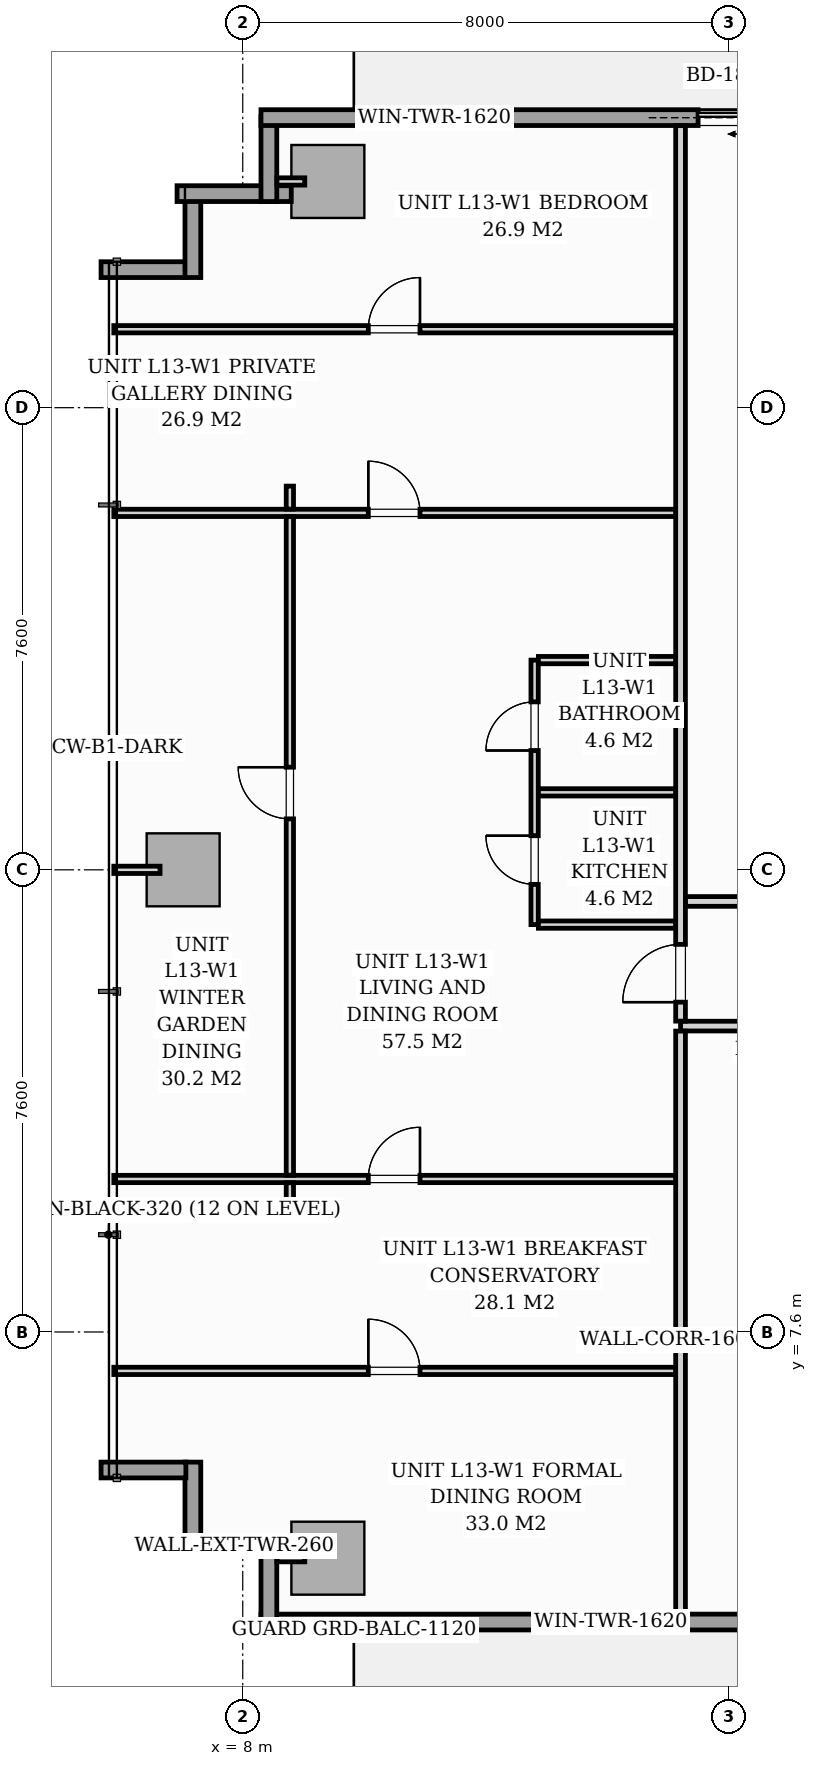
"""IFC4 building model, lengths in metres.
Left out: names, types, materials, properties, quantities, classifications, styles, units other than length and angle.
Written with IfcOpenShell. Run it as: python <this file> out.ifc"""

import sys

from ifc_helpers import new_model, si_unit, direction, frame, frame_2d, origin, origin_2d, place, context, subcontext, project, spatial, rectangle, extrude, source, transform, mapped, element, fill, save


model = new_model("IFC4")
c1 = context("Model", 3, precision=1e-05, world=origin(), true_north=direction((0.0, 1.0)))
c2 = subcontext(c1, "Body", "Model", "MODEL_VIEW")
j1 = project(units=[si_unit("LENGTHUNIT", "METRE"), si_unit("PLANEANGLEUNIT", "RADIAN")], contexts=[c1])
p1 = place(None, origin())
s1 = spatial("IfcSite", under=j1, at=p1, CompositionType="ELEMENT")
p2 = place(p1, origin())
s2 = spatial("IfcBuilding", under=s1, at=p2, CompositionType="ELEMENT")
p3 = place(p2, frame((0.0, 0.0, 48.6)))
s3 = spatial("IfcBuildingStorey", under=s2, at=p3, CompositionType="ELEMENT", Elevation=48.6)
m1 = source(origin(), c2, "Body", "SweptSolid", [
    extrude(rectangle(XDim=1.2, YDim=1.2, at=origin_2d()), origin(), (0.0, 0.0, 1.0), 3.196),
])
for number, where, z_axis, x_axis in (
    (1, (9.4, 3.88, 0.002), (0.0, 0.0, 1.0), (1.0, 0.0, 0.0)),
    (2, (9.4, 26.52, 0.002), (0.0, 0.0, 1.0), (1.0, 0.0, 0.0)),
    (3, (7.02, 15.2, 0.002), (0.0, 0.0, 1.0), (1.0, 0.0, 0.0)),
):
    element("IfcColumn", number, at=place(p3, frame(where, z_axis=z_axis, x_axis=x_axis)), inside=s3, PredefinedType="COLUMN", context=c2, shape_type="MappedRepresentation", body=[
        mapped(m1, transform((0.0, 0.0, 0.0), scale=1.0)),
    ])
p4 = place(p3, frame((8.798, 4.08, 0.0), z_axis=(0.0, 0.0, 1.0), x_axis=(-1.0, 0.0, 0.0)))
e4 = element("IfcWall", 4, at=p4, inside=s3, PredefinedType="STANDARD", context=c2, shape_type="SweptSolid", body=[
    extrude(rectangle(XDim=1.878, YDim=0.26, at=frame_2d((0.939, 0.0))), origin(), (0.0, 0.0, 1.0), 2.94),
])
for number, where, z_axis, x_axis in (
    (5, (7.18, 4.065, 0.0), (0.0, 0.0, 1.0), (0.0, 1.0, 0.0)),
    (6, (7.065, 5.33, 0.0), (0.0, 0.0, 1.0), (-1.0, 0.0, 0.0)),
    (7, (5.67, 25.07, 0.0), (0.0, 0.0, 1.0), (1.0, 0.0, 0.0)),
    (8, (7.18, 24.94, 0.0), (0.0, 0.0, 1.0), (0.0, 1.0, 0.0)),
):
    element("IfcWall", number, at=place(p3, frame(where, z_axis=z_axis, x_axis=x_axis)), inside=s3, PredefinedType="STANDARD", context=c2, shape_type="SweptSolid", body=[
        extrude(rectangle(XDim=1.395, YDim=0.26, at=frame_2d((0.698, 0.0))), origin(), (0.0, 0.0, 1.0), 2.94),
    ])
p5 = place(p3, frame((6.92, 26.32, 0.0), z_axis=(0.0, 0.0, 1.0), x_axis=(1.0, 0.0, 0.0)))
e9 = element("IfcWall", 9, at=p5, inside=s3, PredefinedType="STANDARD", context=c2, shape_type="SweptSolid", body=[
    extrude(rectangle(XDim=1.878, YDim=0.26, at=frame_2d((0.939, 0.0))), origin(), (0.0, 0.0, 1.0), 2.94),
])
p6 = place(p3, frame((8.43, 26.19, 0.0), z_axis=(0.0, 0.0, 1.0), x_axis=(0.0, 1.0, 0.0)))
e10 = element("IfcWall", 10, at=p6, inside=s3, PredefinedType="STANDARD", context=c2, shape_type="SweptSolid", body=[
    extrude(rectangle(XDim=1.395, YDim=0.26, at=frame_2d((0.698, 0.0))), origin(), (0.0, 0.0, 1.0), 2.94),
])
p7 = place(p3, frame((8.3, 27.57, 0.0), z_axis=(0.0, 0.0, 1.0), x_axis=(1.0, 0.0, 0.0)))
e11 = element("IfcWall", 11, at=p7, inside=s3, PredefinedType="STANDARD", context=c2, shape_type="SweptSolid", body=[
    extrude(rectangle(XDim=17.15, YDim=0.26, at=frame_2d((8.575, 0.0))), origin(), (0.0, 0.0, 1.0), 2.94),
])
p8 = place(p7, frame((7.188, 0.0, 0.0)))
e12 = element("IfcOpeningElement", 12, at=p8, cuts=e11, PredefinedType="OPENING", context=c2, shape_type="SweptSolid", body=[
    extrude(rectangle(XDim=1.8, YDim=2.06, at=frame_2d((0.9, 1.03))), frame((0.0, 0.14, 0.0), z_axis=(0.0, -1.0, 0.0), x_axis=(1.0, 0.0, 0.0)), (0.0, 0.0, 1.0), 0.28),
])
p9 = place(p7, frame((2.05, 0.0, 0.65)))
e13 = element("IfcOpeningElement", 13, at=p9, cuts=e11, PredefinedType="OPENING", context=c2, shape_type="SweptSolid", body=[
    extrude(rectangle(XDim=1.6, YDim=1.5, at=frame_2d((0.8, 0.75))), frame((0.0, 0.14, 0.0), z_axis=(0.0, -1.0, 0.0), x_axis=(1.0, 0.0, 0.0)), (0.0, 0.0, 1.0), 0.28),
])
p10 = place(p3, frame((25.45, 2.83, 0.0), z_axis=(0.0, 0.0, 1.0), x_axis=(-1.0, 0.0, 0.0)))
e14 = element("IfcWall", 14, at=p10, inside=s3, PredefinedType="STANDARD", context=c2, shape_type="SweptSolid", body=[
    extrude(rectangle(XDim=17.15, YDim=0.26, at=frame_2d((8.575, 0.0))), origin(), (0.0, 0.0, 1.0), 2.94),
])
p11 = place(p10, frame((7.07, 0.0, 0.0)))
e15 = element("IfcOpeningElement", 15, at=p11, cuts=e14, PredefinedType="OPENING", context=c2, shape_type="SweptSolid", body=[
    extrude(rectangle(XDim=1.8, YDim=2.06, at=frame_2d((0.9, 1.03))), frame((0.0, 0.14, 0.0), z_axis=(0.0, -1.0, 0.0), x_axis=(1.0, 0.0, 0.0)), (0.0, 0.0, 1.0), 0.28),
])
p12 = place(p10, frame((10.6, 0.0, 0.65)))
e16 = element("IfcOpeningElement", 16, at=p12, cuts=e14, PredefinedType="OPENING", context=c2, shape_type="SweptSolid", body=[
    extrude(rectangle(XDim=1.6, YDim=1.5, at=frame_2d((0.8, 0.75))), frame((0.0, 0.14, 0.0), z_axis=(0.0, -1.0, 0.0), x_axis=(1.0, 0.0, 0.0)), (0.0, 0.0, 1.0), 0.28),
])
p13 = place(p10, frame((0.413, 0.0, 0.75)))
e17 = element("IfcOpeningElement", 17, at=p13, cuts=e14, PredefinedType="OPENING", context=c2, shape_type="SweptSolid", body=[
    extrude(rectangle(XDim=1.6, YDim=1.5, at=frame_2d((0.8, 0.75))), frame((0.0, 0.14, 0.0), z_axis=(0.0, -1.0, 0.0), x_axis=(1.0, 0.0, 0.0)), (0.0, 0.0, 1.0), 0.28),
])
p14 = place(p3, frame((8.43, 2.815, 0.0), z_axis=(0.0, 0.0, 1.0), x_axis=(0.0, 1.0, 0.0)))
e18 = element("IfcWall", 18, at=p14, inside=s3, PredefinedType="STANDARD", context=c2, shape_type="SweptSolid", body=[
    extrude(rectangle(XDim=1.395, YDim=0.26, at=frame_2d((0.698, 0.0))), origin(), (0.0, 0.0, 1.0), 2.94),
])
p15 = place(p3, frame((15.2, 12.63, 0.0), z_axis=(0.0, 0.0, 1.0), x_axis=(1.0, 0.0, 0.0)))
e19 = element("IfcWall", 19, at=p15, inside=s3, PredefinedType="PARTITIONING", context=c2, shape_type="SweptSolid", body=[
    extrude(rectangle(XDim=37.1, YDim=0.16, at=frame_2d((18.55, 0.0))), origin(), (0.0, 0.0, 1.0), 2.94),
])
p16 = place(p15, frame((1.572, 0.0, 0.0)))
e20 = element("IfcOpeningElement", 20, at=p16, cuts=e19, PredefinedType="OPENING", context=c2, shape_type="SweptSolid", body=[
    extrude(rectangle(XDim=0.95, YDim=2.06, at=frame_2d((0.475, 1.03))), frame((0.0, 0.09, 0.0), z_axis=(0.0, -1.0, 0.0), x_axis=(1.0, 0.0, 0.0)), (0.0, 0.0, 1.0), 0.18),
])
p17 = place(p15, frame((14.877, 0.0, 0.0)))
e21 = element("IfcOpeningElement", 21, at=p17, cuts=e19, PredefinedType="OPENING", context=c2, shape_type="SweptSolid", body=[
    extrude(rectangle(XDim=0.95, YDim=2.06, at=frame_2d((0.475, 1.03))), frame((0.0, 0.09, 0.0), z_axis=(0.0, -1.0, 0.0), x_axis=(1.0, 0.0, 0.0)), (0.0, 0.0, 1.0), 0.18),
])
p18 = place(p15, frame((28.476, 0.0, 0.0)))
e22 = element("IfcOpeningElement", 22, at=p18, cuts=e19, PredefinedType="OPENING", context=c2, shape_type="SweptSolid", body=[
    extrude(rectangle(XDim=0.95, YDim=2.06, at=frame_2d((0.475, 1.03))), frame((0.0, 0.09, 0.0), z_axis=(0.0, -1.0, 0.0), x_axis=(1.0, 0.0, 0.0)), (0.0, 0.0, 1.0), 0.18),
])
p19 = place(p3, frame((15.2, 2.962, 0.0), z_axis=(0.0, 0.0, 1.0), x_axis=(0.0, 1.0, 0.0)))
e23 = element("IfcWall", 23, at=p19, inside=s3, PredefinedType="PARTITIONING", context=c2, shape_type="SweptSolid", body=[
    extrude(rectangle(XDim=9.586, YDim=0.16, at=frame_2d((4.793, 0.0))), origin(), (0.0, 0.0, 1.0), 2.94),
])
p20 = place(p3, frame((15.2, 12.712, 0.0), z_axis=(0.0, 0.0, 1.0), x_axis=(0.0, 1.0, 0.0)))
e24 = element("IfcWall", 24, at=p20, inside=s3, PredefinedType="PARTITIONING", context=c2, shape_type="SweptSolid", body=[
    extrude(rectangle(XDim=14.726, YDim=0.16, at=frame_2d((7.363, 0.0))), origin(), (0.0, 0.0, 1.0), 2.94),
])
p21 = place(p20, frame((0.312, 0.0, 0.0)))
e25 = element("IfcOpeningElement", 25, at=p21, cuts=e24, PredefinedType="OPENING", context=c2, shape_type="SweptSolid", body=[
    extrude(rectangle(XDim=0.95, YDim=2.06, at=frame_2d((0.475, 1.03))), frame((0.0, 0.09, 0.0), z_axis=(0.0, -1.0, 0.0), x_axis=(1.0, 0.0, 0.0)), (0.0, 0.0, 1.0), 0.18),
])
p22 = place(p3, frame((12.8, 14.299, 0.0), z_axis=(0.0, 0.0, 1.0), x_axis=(0.0, 1.0, 0.0)))
e26 = element("IfcWall", 26, at=p22, inside=s3, PredefinedType="PARTITIONING", context=c2, shape_type="SweptSolid", body=[
    extrude(rectangle(XDim=4.35, YDim=0.12, at=frame_2d((2.175, 0.0))), origin(), (0.0, 0.0, 1.0), 2.94),
])
p23 = place(p22, frame((0.662, 0.0, 0.0)))
e27 = element("IfcOpeningElement", 27, at=p23, cuts=e26, PredefinedType="OPENING", context=c2, shape_type="SweptSolid", body=[
    extrude(rectangle(XDim=0.8, YDim=2.0, at=frame_2d((0.4, 1.0))), frame((0.0, 0.07, 0.0), z_axis=(0.0, -1.0, 0.0), x_axis=(1.0, 0.0, 0.0)), (0.0, 0.0, 1.0), 0.14),
])
p24 = place(p22, frame((2.863, 0.0, 0.0)))
e28 = element("IfcOpeningElement", 28, at=p24, cuts=e26, PredefinedType="OPENING", context=c2, shape_type="SweptSolid", body=[
    extrude(rectangle(XDim=0.8, YDim=2.02, at=frame_2d((0.4, 1.01))), frame((0.0, 0.07, 0.0), z_axis=(0.0, -1.0, 0.0), x_axis=(1.0, 0.0, 0.0)), (0.0, 0.0, 1.0), 0.14),
])
for number, where, z_axis, x_axis in (
    (29, (12.862, 16.474, 0.0), (0.0, 0.0, 1.0), (1.0, 0.0, 0.0)),
    (30, (12.862, 14.299, 0.0), (0.0, 0.0, 1.0), (1.0, 0.0, 0.0)),
    (31, (12.862, 18.649, 0.0), (0.0, 0.0, 1.0), (1.0, 0.0, 0.0)),
):
    element("IfcWall", number, at=place(p3, frame(where, z_axis=z_axis, x_axis=x_axis)), inside=s3, PredefinedType="PARTITIONING", context=c2, shape_type="SweptSolid", body=[
        extrude(rectangle(XDim=2.256, YDim=0.12, at=frame_2d((1.128, 0.0))), origin(), (0.0, 0.0, 1.0), 2.94),
    ])
p25 = place(p3, frame((5.88, 24.09, 0.0), z_axis=(0.0, 0.0, 1.0), x_axis=(1.0, 0.0, 0.0)))
e32 = element("IfcWall", 32, at=p25, inside=s3, PredefinedType="PARTITIONING", context=c2, shape_type="SweptSolid", body=[
    extrude(rectangle(XDim=9.238, YDim=0.12, at=frame_2d((4.619, 0.0))), origin(), (0.0, 0.0, 1.0), 2.94),
])
p26 = place(p25, frame((4.185, 0.0, 0.0)))
e33 = element("IfcOpeningElement", 33, at=p26, cuts=e32, PredefinedType="OPENING", context=c2, shape_type="SweptSolid", body=[
    extrude(rectangle(XDim=0.85, YDim=2.05, at=frame_2d((0.425, 1.025))), frame((0.0, 0.07, 0.0), z_axis=(0.0, -1.0, 0.0), x_axis=(1.0, 0.0, 0.0)), (0.0, 0.0, 1.0), 0.14),
])
p27 = place(p3, frame((5.88, 6.96, 0.0), z_axis=(0.0, 0.0, 1.0), x_axis=(1.0, 0.0, 0.0)))
e34 = element("IfcWall", 34, at=p27, inside=s3, PredefinedType="PARTITIONING", context=c2, shape_type="SweptSolid", body=[
    extrude(rectangle(XDim=9.238, YDim=0.12, at=frame_2d((4.619, 0.0))), origin(), (0.0, 0.0, 1.0), 2.94),
])
p28 = place(p27, frame((4.185, 0.0, 0.0)))
e35 = element("IfcOpeningElement", 35, at=p28, cuts=e34, PredefinedType="OPENING", context=c2, shape_type="SweptSolid", body=[
    extrude(rectangle(XDim=0.85, YDim=2.05, at=frame_2d((0.425, 1.025))), frame((0.0, 0.07, 0.0), z_axis=(0.0, -1.0, 0.0), x_axis=(1.0, 0.0, 0.0)), (0.0, 0.0, 1.0), 0.14),
])
p29 = place(p3, frame((5.88, 10.116, 0.0), z_axis=(0.0, 0.0, 1.0), x_axis=(1.0, 0.0, 0.0)))
e36 = element("IfcWall", 36, at=p29, inside=s3, PredefinedType="PARTITIONING", context=c2, shape_type="SweptSolid", body=[
    extrude(rectangle(XDim=9.238, YDim=0.12, at=frame_2d((4.619, 0.0))), origin(), (0.0, 0.0, 1.0), 2.94),
])
p30 = place(p29, frame((4.185, 0.0, 0.0)))
e37 = element("IfcOpeningElement", 37, at=p30, cuts=e36, PredefinedType="OPENING", context=c2, shape_type="SweptSolid", body=[
    extrude(rectangle(XDim=0.85, YDim=2.05, at=frame_2d((0.425, 1.025))), frame((0.0, 0.07, 0.0), z_axis=(0.0, -1.0, 0.0), x_axis=(1.0, 0.0, 0.0)), (0.0, 0.0, 1.0), 0.14),
])
p31 = place(p3, frame((5.88, 21.07, 0.0), z_axis=(0.0, 0.0, 1.0), x_axis=(1.0, 0.0, 0.0)))
e38 = element("IfcWall", 38, at=p31, inside=s3, PredefinedType="PARTITIONING", context=c2, shape_type="SweptSolid", body=[
    extrude(rectangle(XDim=9.238, YDim=0.12, at=frame_2d((4.619, 0.0))), origin(), (0.0, 0.0, 1.0), 2.94),
])
p32 = place(p31, frame((4.185, 0.0, 0.0)))
e39 = element("IfcOpeningElement", 39, at=p32, cuts=e38, PredefinedType="OPENING", context=c2, shape_type="SweptSolid", body=[
    extrude(rectangle(XDim=0.85, YDim=2.05, at=frame_2d((0.425, 1.025))), frame((0.0, 0.07, 0.0), z_axis=(0.0, -1.0, 0.0), x_axis=(1.0, 0.0, 0.0)), (0.0, 0.0, 1.0), 0.14),
])
p33 = place(p3, frame((8.775, 9.676, 0.0), z_axis=(0.0, 0.0, 1.0), x_axis=(0.0, 1.0, 0.0)))
e40 = element("IfcWall", 40, at=p33, inside=s3, PredefinedType="PARTITIONING", context=c2, shape_type="SweptSolid", body=[
    extrude(rectangle(XDim=0.378, YDim=0.12, at=frame_2d((0.189, 0.0))), origin(), (0.0, 0.0, 1.0), 2.94),
])
p34 = place(p3, frame((8.775, 10.178, 0.0), z_axis=(0.0, 0.0, 1.0), x_axis=(0.0, 1.0, 0.0)))
e41 = element("IfcWall", 41, at=p34, inside=s3, PredefinedType="PARTITIONING", context=c2, shape_type="SweptSolid", body=[
    extrude(rectangle(XDim=10.83, YDim=0.12, at=frame_2d((5.415, 0.0))), origin(), (0.0, 0.0, 1.0), 2.94),
])
p35 = place(p34, frame((5.86, 0.0, 0.0)))
e42 = element("IfcOpeningElement", 42, at=p35, cuts=e41, PredefinedType="OPENING", context=c2, shape_type="SweptSolid", body=[
    extrude(rectangle(XDim=0.85, YDim=2.05, at=frame_2d((0.425, 1.025))), frame((0.0, 0.07, 0.0), z_axis=(0.0, -1.0, 0.0), x_axis=(1.0, 0.0, 0.0)), (0.0, 0.0, 1.0), 0.14),
])
p36 = place(p3, frame((8.775, 21.132, 0.0), z_axis=(0.0, 0.0, 1.0), x_axis=(0.0, 1.0, 0.0)))
e43 = element("IfcWall", 43, at=p36, inside=s3, PredefinedType="PARTITIONING", context=c2, shape_type="SweptSolid", body=[
    extrude(rectangle(XDim=0.378, YDim=0.12, at=frame_2d((0.189, 0.0))), origin(), (0.0, 0.0, 1.0), 2.94),
])
p37 = place(p3, frame((15.282, 14.68, 0.0), z_axis=(0.0, 0.0, 1.0), x_axis=(1.0, 0.0, 0.0)))
e44 = element("IfcWall", 44, at=p37, inside=s3, PredefinedType="PARTITIONING", context=c2, shape_type="SweptSolid", body=[
    extrude(rectangle(XDim=10.878, YDim=0.16, at=frame_2d((5.439, 0.0))), origin(), (0.0, 0.0, 1.0), 2.94),
])
p38 = place(p37, frame((4.863, 0.0, 0.0)))
e45 = element("IfcOpeningElement", 45, at=p38, cuts=e44, PredefinedType="OPENING", context=c2, shape_type="SweptSolid", body=[
    extrude(rectangle(XDim=0.95, YDim=2.06, at=frame_2d((0.475, 1.03))), frame((0.0, 0.09, 0.0), z_axis=(0.0, -1.0, 0.0), x_axis=(1.0, 0.0, 0.0)), (0.0, 0.0, 1.0), 0.18),
])
for number, where, z_axis, x_axis in (
    (46, (9.02, 3.88, 0.0), (0.0, 0.0, 1.0), (-1.0, 0.0, 0.0)),
    (47, (9.02, 26.52, 0.0), (0.0, 0.0, 1.0), (-1.0, 0.0, 0.0)),
):
    element("IfcWall", number, at=place(p3, frame(where, z_axis=z_axis, x_axis=x_axis)), inside=s3, PredefinedType="PARTITIONING", context=c2, shape_type="SweptSolid", body=[
        extrude(rectangle(XDim=0.458, YDim=0.12, at=frame_2d((0.229, 0.0))), origin(), (0.0, 0.0, 1.0), 2.94),
    ])
p39 = place(p3, frame((6.64, 15.2, 0.0), z_axis=(0.0, 0.0, 1.0), x_axis=(-1.0, 0.0, 0.0)))
e48 = element("IfcWall", 48, at=p39, inside=s3, PredefinedType="PARTITIONING", context=c2, shape_type="SweptSolid", body=[
    extrude(rectangle(XDim=0.76, YDim=0.12, at=frame_2d((0.38, 0.0))), origin(), (0.0, 0.0, 1.0), 2.94),
])
m2 = source(origin(), c2, "Body", "SweptSolid", [
    extrude(rectangle(XDim=1.8, YDim=2.06, at=frame_2d((0.9, 1.03))), frame((0.0, 0.025, 0.0), z_axis=(0.0, -1.0, 0.0), x_axis=(1.0, 0.0, 0.0)), (0.0, 0.0, 1.0), 0.05),
])
p40 = place(p8, origin())
e49 = element("IfcDoor", 49, at=p40, inside=s3, OperationType="SLIDING_TO_LEFT", PredefinedType="DOOR", context=c2, shape_type="MappedRepresentation", body=[
    mapped(m2, transform((0.0, 0.0, 0.0), scale=1.0)),
])
fill(e12, e49)
m3 = source(origin(), c2, "Body", "SweptSolid", [
    extrude(rectangle(XDim=1.6, YDim=1.5, at=frame_2d((0.8, 0.75))), frame((0.0, 0.03, 0.0), z_axis=(0.0, -1.0, 0.0), x_axis=(1.0, 0.0, 0.0)), (0.0, 0.0, 1.0), 0.06),
])
p41 = place(p9, origin())
e50 = element("IfcWindow", 50, at=p41, inside=s3, PartitioningType="SINGLE_PANEL", PredefinedType="WINDOW", context=c2, shape_type="MappedRepresentation", body=[
    mapped(m3, transform((0.0, 0.0, 0.0), scale=1.0)),
])
fill(e13, e50)
p42 = place(p12, origin())
e51 = element("IfcWindow", 51, at=p42, inside=s3, PartitioningType="SINGLE_PANEL", PredefinedType="WINDOW", context=c2, shape_type="MappedRepresentation", body=[
    mapped(m3, transform((0.0, 0.0, 0.0), scale=1.0)),
])
fill(e16, e51)
m4 = source(origin(), c2, "Body", "SweptSolid", [
    extrude(rectangle(XDim=0.95, YDim=2.06, at=frame_2d((0.475, 1.03))), frame((0.0, 0.025, 0.0), z_axis=(0.0, -1.0, 0.0), x_axis=(1.0, 0.0, 0.0)), (0.0, 0.0, 1.0), 0.05),
])
p43 = place(p21, origin())
e52 = element("IfcDoor", 52, at=p43, inside=s3, OperationType="SINGLE_SWING_LEFT", PredefinedType="DOOR", context=c2, shape_type="MappedRepresentation", body=[
    mapped(m4, transform((0.0, 0.0, 0.0), scale=1.0)),
])
fill(e25, e52)
m5 = source(origin(), c2, "Body", "SweptSolid", [
    extrude(rectangle(XDim=0.8, YDim=2.0, at=frame_2d((0.4, 1.0))), frame((0.0, 0.025, 0.0), z_axis=(0.0, -1.0, 0.0), x_axis=(1.0, 0.0, 0.0)), (0.0, 0.0, 1.0), 0.05),
])
p44 = place(p23, origin())
e53 = element("IfcDoor", 53, at=p44, inside=s3, OperationType="SINGLE_SWING_RIGHT", PredefinedType="DOOR", context=c2, shape_type="MappedRepresentation", body=[
    mapped(m5, transform((0.0, 0.0, 0.0), scale=1.0)),
])
fill(e27, e53)
m6 = source(origin(), c2, "Body", "SweptSolid", [
    extrude(rectangle(XDim=0.8, YDim=2.02, at=frame_2d((0.4, 1.01))), frame((0.0, 0.025, 0.0), z_axis=(0.0, -1.0, 0.0), x_axis=(1.0, 0.0, 0.0)), (0.0, 0.0, 1.0), 0.05),
])
p45 = place(p24, origin())
e54 = element("IfcDoor", 54, at=p45, inside=s3, OperationType="SINGLE_SWING_LEFT", PredefinedType="DOOR", context=c2, shape_type="MappedRepresentation", body=[
    mapped(m6, transform((0.0, 0.0, 0.0), scale=1.0)),
])
fill(e28, e54)
m7 = source(origin(), c2, "Body", "SweptSolid", [
    extrude(rectangle(XDim=0.85, YDim=2.05, at=frame_2d((0.425, 1.025))), frame((0.0, 0.025, 0.0), z_axis=(0.0, -1.0, 0.0), x_axis=(1.0, 0.0, 0.0)), (0.0, 0.0, 1.0), 0.05),
])
p46 = place(p26, origin())
e55 = element("IfcDoor", 55, at=p46, inside=s3, OperationType="SINGLE_SWING_RIGHT", PredefinedType="DOOR", context=c2, shape_type="MappedRepresentation", body=[
    mapped(m7, transform((0.0, 0.0, 0.0), scale=1.0)),
])
fill(e33, e55)
p47 = place(p28, origin())
e56 = element("IfcDoor", 56, at=p47, inside=s3, OperationType="SINGLE_SWING_LEFT", PredefinedType="DOOR", context=c2, shape_type="MappedRepresentation", body=[
    mapped(m7, transform((0.0, 0.0, 0.0), scale=1.0)),
])
fill(e35, e56)
p48 = place(p30, origin())
e57 = element("IfcDoor", 57, at=p48, inside=s3, OperationType="SINGLE_SWING_RIGHT", PredefinedType="DOOR", context=c2, shape_type="MappedRepresentation", body=[
    mapped(m7, transform((0.0, 0.0, 0.0), scale=1.0)),
])
fill(e37, e57)
p49 = place(p32, origin())
e58 = element("IfcDoor", 58, at=p49, inside=s3, OperationType="SINGLE_SWING_LEFT", PredefinedType="DOOR", context=c2, shape_type="MappedRepresentation", body=[
    mapped(m7, transform((0.0, 0.0, 0.0), scale=1.0)),
])
fill(e39, e58)
p50 = place(p35, origin())
e59 = element("IfcDoor", 59, at=p50, inside=s3, OperationType="SINGLE_SWING_RIGHT", PredefinedType="DOOR", context=c2, shape_type="MappedRepresentation", body=[
    mapped(m7, transform((0.0, 0.0, 0.0), scale=1.0)),
])
fill(e42, e59)
save(model, sys.argv[1])
